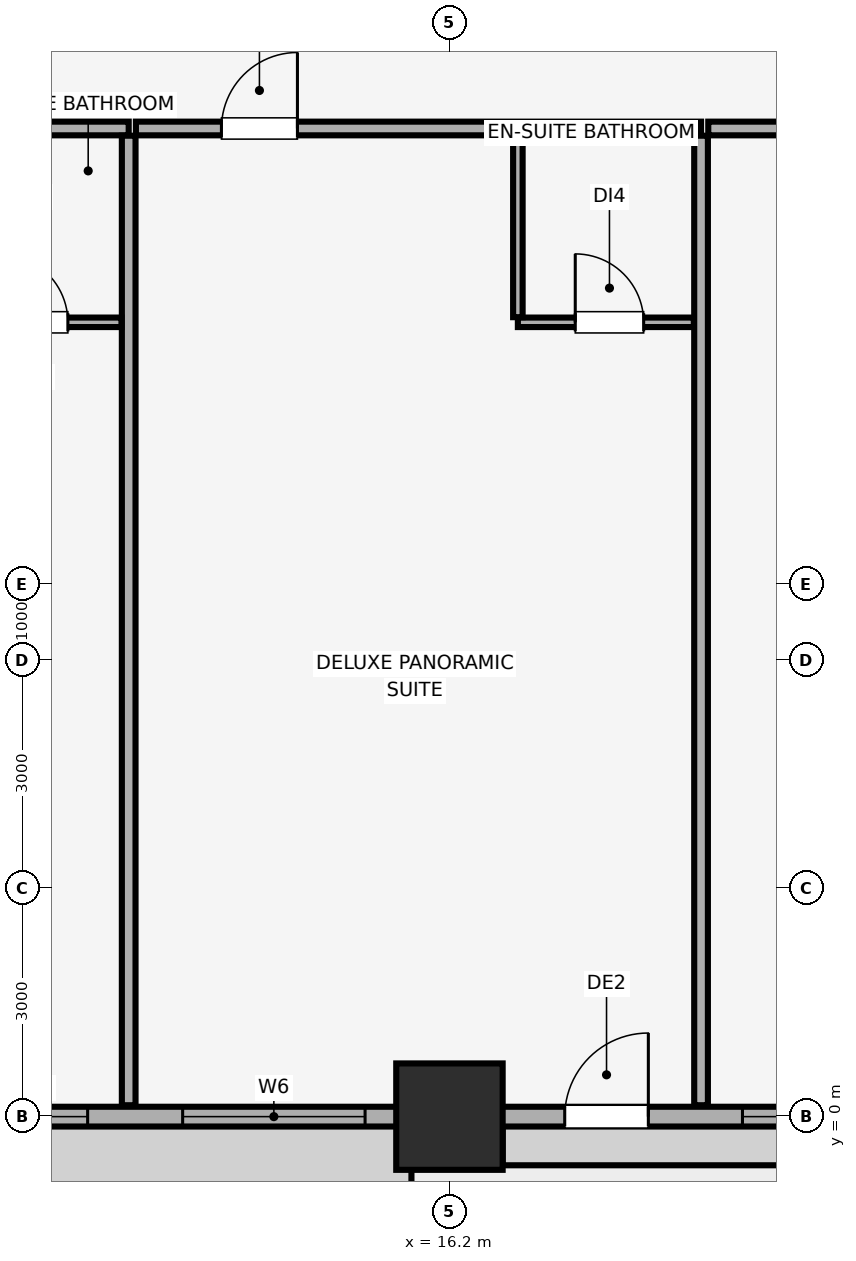
"""IFC4 building model, lengths in metres.
Left out: names, types, materials, properties, quantities, classifications, styles, units other than length and angle.
Written with IfcOpenShell. Run it as: python <this file> out.ifc"""

import sys

from ifc_helpers import new_model, si_unit, direction, frame, frame_2d, origin, origin_2d, place, context, subcontext, project, spatial, rectangle, extrude, element, fill, save


model = new_model("IFC4")
c1 = context("Model", 3, precision=1e-05, world=origin(), true_north=direction((0.0, 1.0)))
c2 = subcontext(c1, "Body", "Model", "MODEL_VIEW")
j1 = project(units=[si_unit("LENGTHUNIT", "METRE"), si_unit("PLANEANGLEUNIT", "RADIAN")], contexts=[c1])
p1 = place(None, origin())
s1 = spatial("IfcSite", under=j1, at=p1, CompositionType="ELEMENT")
p2 = place(p1, origin())
s2 = spatial("IfcBuilding", under=s1, at=p2, CompositionType="ELEMENT")
p3 = place(p2, frame((0.0, 0.0, 68.9)))
s3 = spatial("IfcBuildingStorey", under=s2, at=p3, CompositionType="ELEMENT", Elevation=68.9)
p4 = place(p3, frame((16.2, 0.0, 0.0), z_axis=(0.0, 0.0, 1.0), x_axis=(1.0, 0.0, 0.0)))
e1 = element("IfcColumn", 1, at=p4, inside=s3, PredefinedType="COLUMN", context=c2, shape_type="SweptSolid", body=[
    extrude(rectangle(XDim=1.4, YDim=1.4, at=origin_2d()), origin(), (0.0, 0.0, 1.0), 3.51),
])
p5 = place(p3, frame((4.2, 0.0, 0.0), z_axis=(0.0, 0.0, 1.0), x_axis=(1.0, 0.0, 0.0)))
e2 = element("IfcWall", 2, at=p5, inside=s3, PredefinedType="SOLIDWALL", context=c2, shape_type="SweptSolid", body=[
    extrude(rectangle(XDim=75.6, YDim=0.26, at=frame_2d((37.8, 0.0))), origin(), (0.0, 0.0, 1.0), 2.56),
])
p6 = place(p5, frame((13.517, 0.0, 0.0)))
e3 = element("IfcOpeningElement", 3, at=p6, cuts=e2, PredefinedType="OPENING", context=c2, shape_type="SweptSolid", body=[
    extrude(rectangle(XDim=1.1, YDim=2.15, at=frame_2d((0.55, 1.075))), frame((0.0, 0.14, 0.0), z_axis=(0.0, -1.0, 0.0), x_axis=(1.0, 0.0, 0.0)), (0.0, 0.0, 1.0), 0.28),
])
p7 = place(p5, frame((28.183, 0.0, 0.0)))
e4 = element("IfcOpeningElement", 4, at=p7, cuts=e2, PredefinedType="OPENING", context=c2, shape_type="SweptSolid", body=[
    extrude(rectangle(XDim=1.1, YDim=2.15, at=frame_2d((0.55, 1.075))), frame((0.0, 0.14, 0.0), z_axis=(0.0, -1.0, 0.0), x_axis=(1.0, 0.0, 0.0)), (0.0, 0.0, 1.0), 0.28),
])
p8 = place(p5, frame((58.094, 0.0, 0.0)))
e5 = element("IfcOpeningElement", 5, at=p8, cuts=e2, PredefinedType="OPENING", context=c2, shape_type="SweptSolid", body=[
    extrude(rectangle(XDim=1.1, YDim=2.15, at=frame_2d((0.55, 1.075))), frame((0.0, 0.14, 0.0), z_axis=(0.0, -1.0, 0.0), x_axis=(1.0, 0.0, 0.0)), (0.0, 0.0, 1.0), 0.28),
])
p9 = place(p5, frame((1.035, 0.0, 0.85)))
e6 = element("IfcOpeningElement", 6, at=p9, cuts=e2, PredefinedType="OPENING", context=c2, shape_type="SweptSolid", body=[
    extrude(rectangle(XDim=2.4, YDim=1.5, at=frame_2d((1.2, 0.75))), frame((0.0, 0.14, 0.0), z_axis=(0.0, -1.0, 0.0), x_axis=(1.0, 0.0, 0.0)), (0.0, 0.0, 1.0), 0.28),
])
p10 = place(p5, frame((5.74, 0.0, 0.85)))
e7 = element("IfcOpeningElement", 7, at=p10, cuts=e2, PredefinedType="OPENING", context=c2, shape_type="SweptSolid", body=[
    extrude(rectangle(XDim=1.5, YDim=1.4, at=frame_2d((0.75, 0.7))), frame((0.0, 0.14, 0.0), z_axis=(0.0, -1.0, 0.0), x_axis=(1.0, 0.0, 0.0)), (0.0, 0.0, 1.0), 0.28),
])
p11 = place(p5, frame((8.49, 0.0, 0.85)))
e8 = element("IfcOpeningElement", 8, at=p11, cuts=e2, PredefinedType="OPENING", context=c2, shape_type="SweptSolid", body=[
    extrude(rectangle(XDim=2.4, YDim=1.5, at=frame_2d((1.2, 0.75))), frame((0.0, 0.14, 0.0), z_axis=(0.0, -1.0, 0.0), x_axis=(1.0, 0.0, 0.0)), (0.0, 0.0, 1.0), 0.28),
])
p12 = place(p5, frame((15.855, 0.0, 0.85)))
e9 = element("IfcOpeningElement", 9, at=p12, cuts=e2, PredefinedType="OPENING", context=c2, shape_type="SweptSolid", body=[
    extrude(rectangle(XDim=2.4, YDim=1.5, at=frame_2d((1.2, 0.75))), frame((0.0, 0.14, 0.0), z_axis=(0.0, -1.0, 0.0), x_axis=(1.0, 0.0, 0.0)), (0.0, 0.0, 1.0), 0.28),
])
p13 = place(p5, frame((20.02, 0.0, 0.85)))
e10 = element("IfcOpeningElement", 10, at=p13, cuts=e2, PredefinedType="OPENING", context=c2, shape_type="SweptSolid", body=[
    extrude(rectangle(XDim=2.4, YDim=1.5, at=frame_2d((1.2, 0.75))), frame((0.0, 0.14, 0.0), z_axis=(0.0, -1.0, 0.0), x_axis=(1.0, 0.0, 0.0)), (0.0, 0.0, 1.0), 0.28),
])
p14 = place(p5, frame((23.67, 0.0, 0.85)))
e11 = element("IfcOpeningElement", 11, at=p14, cuts=e2, PredefinedType="OPENING", context=c2, shape_type="SweptSolid", body=[
    extrude(rectangle(XDim=1.5, YDim=1.4, at=frame_2d((0.75, 0.7))), frame((0.0, 0.14, 0.0), z_axis=(0.0, -1.0, 0.0), x_axis=(1.0, 0.0, 0.0)), (0.0, 0.0, 1.0), 0.28),
])
p15 = place(p5, frame((31.035, 0.0, 0.85)))
e12 = element("IfcOpeningElement", 12, at=p15, cuts=e2, PredefinedType="OPENING", context=c2, shape_type="SweptSolid", body=[
    extrude(rectangle(XDim=1.5, YDim=1.4, at=frame_2d((0.75, 0.7))), frame((0.0, 0.14, 0.0), z_axis=(0.0, -1.0, 0.0), x_axis=(1.0, 0.0, 0.0)), (0.0, 0.0, 1.0), 0.28),
])
p16 = place(p5, frame((34.75, 0.0, 0.85)))
e13 = element("IfcOpeningElement", 13, at=p16, cuts=e2, PredefinedType="OPENING", context=c2, shape_type="SweptSolid", body=[
    extrude(rectangle(XDim=2.4, YDim=1.5, at=frame_2d((1.2, 0.75))), frame((0.0, 0.14, 0.0), z_axis=(0.0, -1.0, 0.0), x_axis=(1.0, 0.0, 0.0)), (0.0, 0.0, 1.0), 0.28),
])
p17 = place(p5, frame((38.55, 0.0, 0.85)))
e14 = element("IfcOpeningElement", 14, at=p17, cuts=e2, PredefinedType="OPENING", context=c2, shape_type="SweptSolid", body=[
    extrude(rectangle(XDim=2.4, YDim=1.5, at=frame_2d((1.2, 0.75))), frame((0.0, 0.14, 0.0), z_axis=(0.0, -1.0, 0.0), x_axis=(1.0, 0.0, 0.0)), (0.0, 0.0, 1.0), 0.28),
])
p18 = place(p5, frame((43.165, 0.0, 0.85)))
e15 = element("IfcOpeningElement", 15, at=p18, cuts=e2, PredefinedType="OPENING", context=c2, shape_type="SweptSolid", body=[
    extrude(rectangle(XDim=1.5, YDim=1.4, at=frame_2d((0.75, 0.7))), frame((0.0, 0.14, 0.0), z_axis=(0.0, -1.0, 0.0), x_axis=(1.0, 0.0, 0.0)), (0.0, 0.0, 1.0), 0.28),
])
p19 = place(p5, frame((45.915, 0.0, 0.85)))
e16 = element("IfcOpeningElement", 16, at=p19, cuts=e2, PredefinedType="OPENING", context=c2, shape_type="SweptSolid", body=[
    extrude(rectangle(XDim=2.4, YDim=1.5, at=frame_2d((1.2, 0.75))), frame((0.0, 0.14, 0.0), z_axis=(0.0, -1.0, 0.0), x_axis=(1.0, 0.0, 0.0)), (0.0, 0.0, 1.0), 0.28),
])
p20 = place(p5, frame((50.081, 0.0, 0.85)))
e17 = element("IfcOpeningElement", 17, at=p20, cuts=e2, PredefinedType="OPENING", context=c2, shape_type="SweptSolid", body=[
    extrude(rectangle(XDim=2.4, YDim=1.5, at=frame_2d((1.2, 0.75))), frame((0.0, 0.14, 0.0), z_axis=(0.0, -1.0, 0.0), x_axis=(1.0, 0.0, 0.0)), (0.0, 0.0, 1.0), 0.28),
])
p21 = place(p5, frame((53.73, 0.0, 0.85)))
e18 = element("IfcOpeningElement", 18, at=p21, cuts=e2, PredefinedType="OPENING", context=c2, shape_type="SweptSolid", body=[
    extrude(rectangle(XDim=1.5, YDim=1.4, at=frame_2d((0.75, 0.7))), frame((0.0, 0.14, 0.0), z_axis=(0.0, -1.0, 0.0), x_axis=(1.0, 0.0, 0.0)), (0.0, 0.0, 1.0), 0.28),
])
p22 = place(p5, frame((61.095, 0.0, 0.85)))
e19 = element("IfcOpeningElement", 19, at=p22, cuts=e2, PredefinedType="OPENING", context=c2, shape_type="SweptSolid", body=[
    extrude(rectangle(XDim=1.5, YDim=1.4, at=frame_2d((0.75, 0.7))), frame((0.0, 0.14, 0.0), z_axis=(0.0, -1.0, 0.0), x_axis=(1.0, 0.0, 0.0)), (0.0, 0.0, 1.0), 0.28),
])
p23 = place(p5, frame((64.76, 0.0, 0.85)))
e20 = element("IfcOpeningElement", 20, at=p23, cuts=e2, PredefinedType="OPENING", context=c2, shape_type="SweptSolid", body=[
    extrude(rectangle(XDim=2.4, YDim=1.5, at=frame_2d((1.2, 0.75))), frame((0.0, 0.14, 0.0), z_axis=(0.0, -1.0, 0.0), x_axis=(1.0, 0.0, 0.0)), (0.0, 0.0, 1.0), 0.28),
])
p24 = place(p5, frame((68.41, 0.0, 0.85)))
e21 = element("IfcOpeningElement", 21, at=p24, cuts=e2, PredefinedType="OPENING", context=c2, shape_type="SweptSolid", body=[
    extrude(rectangle(XDim=1.5, YDim=1.4, at=frame_2d((0.75, 0.7))), frame((0.0, 0.14, 0.0), z_axis=(0.0, -1.0, 0.0), x_axis=(1.0, 0.0, 0.0)), (0.0, 0.0, 1.0), 0.28),
])
p25 = place(p5, frame((72.165, 0.0, 0.85)))
e22 = element("IfcOpeningElement", 22, at=p25, cuts=e2, PredefinedType="OPENING", context=c2, shape_type="SweptSolid", body=[
    extrude(rectangle(XDim=2.4, YDim=1.5, at=frame_2d((1.2, 0.75))), frame((0.0, 0.14, 0.0), z_axis=(0.0, -1.0, 0.0), x_axis=(1.0, 0.0, 0.0)), (0.0, 0.0, 1.0), 0.28),
])
p26 = place(p3, frame((0.15, 13.0, 0.0), z_axis=(0.0, 0.0, 1.0), x_axis=(1.0, 0.0, 0.0)))
e23 = element("IfcWall", 23, at=p26, inside=s3, PredefinedType="PARTITIONING", context=c2, shape_type="SweptSolid", body=[
    extrude(rectangle(XDim=11.83, YDim=0.18, at=frame_2d((5.915, 0.0))), origin(), (0.0, 0.0, 1.0), 3.51),
])
p27 = place(p26, frame((5.685, 0.0, 0.0)))
e24 = element("IfcOpeningElement", 24, at=p27, cuts=e23, PredefinedType="OPENING", context=c2, shape_type="SweptSolid", body=[
    extrude(rectangle(XDim=1.0, YDim=2.15, at=frame_2d((0.5, 1.075))), frame((0.0, 0.1, 0.0), z_axis=(0.0, -1.0, 0.0), x_axis=(1.0, 0.0, 0.0)), (0.0, 0.0, 1.0), 0.2),
])
p28 = place(p3, frame((11.98, 0.15, 0.0), z_axis=(0.0, 0.0, 1.0), x_axis=(0.0, 1.0, 0.0)))
e25 = element("IfcWall", 25, at=p28, inside=s3, PredefinedType="PARTITIONING", context=c2, shape_type="SweptSolid", body=[
    extrude(rectangle(XDim=12.755, YDim=0.18, at=frame_2d((6.377, 0.0))), origin(), (0.0, 0.0, 1.0), 3.51),
])
p29 = place(p3, frame((9.48, 10.45, 0.0), z_axis=(0.0, 0.0, 1.0), x_axis=(1.0, 0.0, 0.0)))
e26 = element("IfcWall", 26, at=p29, inside=s3, PredefinedType="PARTITIONING", context=c2, shape_type="SweptSolid", body=[
    extrude(rectangle(XDim=2.405, YDim=0.125, at=frame_2d((1.203, 0.0))), origin(), (0.0, 0.0, 1.0), 3.51),
])
p30 = place(p29, frame((0.8, 0.0, 0.0)))
e27 = element("IfcOpeningElement", 27, at=p30, cuts=e26, PredefinedType="OPENING", context=c2, shape_type="SweptSolid", body=[
    extrude(rectangle(XDim=0.9, YDim=2.1, at=frame_2d((0.45, 1.05))), frame((0.0, 0.073, 0.0), z_axis=(0.0, -1.0, 0.0), x_axis=(1.0, 0.0, 0.0)), (0.0, 0.0, 1.0), 0.145),
])
p31 = place(p3, frame((12.075, 13.0, 0.0), z_axis=(0.0, 0.0, 1.0), x_axis=(1.0, 0.0, 0.0)))
e28 = element("IfcWall", 28, at=p31, inside=s3, PredefinedType="PARTITIONING", context=c2, shape_type="SweptSolid", body=[
    extrude(rectangle(XDim=7.435, YDim=0.18, at=frame_2d((3.718, 0.0))), origin(), (0.0, 0.0, 1.0), 3.51),
])
p32 = place(p31, frame((1.125, 0.0, 0.0)))
e29 = element("IfcOpeningElement", 29, at=p32, cuts=e28, PredefinedType="OPENING", context=c2, shape_type="SweptSolid", body=[
    extrude(rectangle(XDim=1.0, YDim=2.15, at=frame_2d((0.5, 1.075))), frame((0.0, 0.1, 0.0), z_axis=(0.0, -1.0, 0.0), x_axis=(1.0, 0.0, 0.0)), (0.0, 0.0, 1.0), 0.2),
])
p33 = place(p3, frame((19.51, 0.15, 0.0), z_axis=(0.0, 0.0, 1.0), x_axis=(0.0, 1.0, 0.0)))
e30 = element("IfcWall", 30, at=p33, inside=s3, PredefinedType="PARTITIONING", context=c2, shape_type="SweptSolid", body=[
    extrude(rectangle(XDim=12.755, YDim=0.18, at=frame_2d((6.377, 0.0))), origin(), (0.0, 0.0, 1.0), 3.51),
])
p34 = place(p3, frame((17.1, 10.45, 0.0), z_axis=(0.0, 0.0, 1.0), x_axis=(1.0, 0.0, 0.0)))
e31 = element("IfcWall", 31, at=p34, inside=s3, PredefinedType="PARTITIONING", context=c2, shape_type="SweptSolid", body=[
    extrude(rectangle(XDim=2.315, YDim=0.125, at=frame_2d((1.158, 0.0))), origin(), (0.0, 0.0, 1.0), 3.51),
])
p35 = place(p34, frame((0.755, 0.0, 0.0)))
e32 = element("IfcOpeningElement", 32, at=p35, cuts=e31, PredefinedType="OPENING", context=c2, shape_type="SweptSolid", body=[
    extrude(rectangle(XDim=0.9, YDim=2.1, at=frame_2d((0.45, 1.05))), frame((0.0, 0.073, 0.0), z_axis=(0.0, -1.0, 0.0), x_axis=(1.0, 0.0, 0.0)), (0.0, 0.0, 1.0), 0.145),
])
p36 = place(p3, frame((17.1, 10.518, 0.0), z_axis=(0.0, 0.0, 1.0), x_axis=(0.0, 1.0, 0.0)))
e33 = element("IfcWall", 33, at=p36, inside=s3, PredefinedType="PARTITIONING", context=c2, shape_type="SweptSolid", body=[
    extrude(rectangle(XDim=2.387, YDim=0.125, at=frame_2d((1.194, 0.0))), origin(), (0.0, 0.0, 1.0), 3.51),
])
p37 = place(p3, frame((19.605, 13.0, 0.0), z_axis=(0.0, 0.0, 1.0), x_axis=(1.0, 0.0, 0.0)))
e34 = element("IfcWall", 34, at=p37, inside=s3, PredefinedType="PARTITIONING", context=c2, shape_type="SweptSolid", body=[
    extrude(rectangle(XDim=7.435, YDim=0.18, at=frame_2d((3.718, 0.0))), origin(), (0.0, 0.0, 1.0), 3.51),
])
p38 = place(p37, frame((0.96, 0.0, 0.0)))
e35 = element("IfcOpeningElement", 35, at=p38, cuts=e34, PredefinedType="OPENING", context=c2, shape_type="SweptSolid", body=[
    extrude(rectangle(XDim=1.0, YDim=2.15, at=frame_2d((0.5, 1.075))), frame((0.0, 0.1, 0.0), z_axis=(0.0, -1.0, 0.0), x_axis=(1.0, 0.0, 0.0)), (0.0, 0.0, 1.0), 0.2),
])
p39 = place(p6, origin())
e36 = element("IfcDoor", 36, at=p39, inside=s3, OperationType="SINGLE_SWING_RIGHT", PredefinedType="DOOR", context=c2, shape_type="SweptSolid", body=[
    extrude(rectangle(XDim=1.1, YDim=2.15, at=frame_2d((0.55, 1.075))), frame((0.0, 0.025, 0.0), z_axis=(0.0, -1.0, 0.0), x_axis=(1.0, 0.0, 0.0)), (0.0, 0.0, 1.0), 0.05),
])
fill(e3, e36)
p40 = place(p10, origin())
e37 = element("IfcWindow", 37, at=p40, inside=s3, PartitioningType="SINGLE_PANEL", PredefinedType="WINDOW", context=c2, shape_type="SweptSolid", body=[
    extrude(rectangle(XDim=1.5, YDim=1.4, at=frame_2d((0.75, 0.7))), frame((0.0, 0.03, 0.0), z_axis=(0.0, -1.0, 0.0), x_axis=(1.0, 0.0, 0.0)), (0.0, 0.0, 1.0), 0.06),
])
fill(e7, e37)
p41 = place(p11, origin())
e38 = element("IfcWindow", 38, at=p41, inside=s3, PartitioningType="SINGLE_PANEL", PredefinedType="WINDOW", context=c2, shape_type="SweptSolid", body=[
    extrude(rectangle(XDim=2.4, YDim=1.5, at=frame_2d((1.2, 0.75))), frame((0.0, 0.03, 0.0), z_axis=(0.0, -1.0, 0.0), x_axis=(1.0, 0.0, 0.0)), (0.0, 0.0, 1.0), 0.06),
])
fill(e8, e38)
p42 = place(p12, origin())
e39 = element("IfcWindow", 39, at=p42, inside=s3, PartitioningType="SINGLE_PANEL", PredefinedType="WINDOW", context=c2, shape_type="SweptSolid", body=[
    extrude(rectangle(XDim=2.4, YDim=1.5, at=frame_2d((1.2, 0.75))), frame((0.0, 0.03, 0.0), z_axis=(0.0, -1.0, 0.0), x_axis=(1.0, 0.0, 0.0)), (0.0, 0.0, 1.0), 0.06),
])
fill(e9, e39)
p43 = place(p30, origin())
e40 = element("IfcDoor", 40, at=p43, inside=s3, OperationType="SINGLE_SWING_LEFT", PredefinedType="DOOR", context=c2, shape_type="SweptSolid", body=[
    extrude(rectangle(XDim=0.9, YDim=2.1, at=frame_2d((0.45, 1.05))), frame((0.0, 0.025, 0.0), z_axis=(0.0, -1.0, 0.0), x_axis=(1.0, 0.0, 0.0)), (0.0, 0.0, 1.0), 0.05),
])
fill(e27, e40)
p44 = place(p32, origin())
e41 = element("IfcDoor", 41, at=p44, inside=s3, OperationType="SINGLE_SWING_RIGHT", PredefinedType="DOOR", context=c2, shape_type="SweptSolid", body=[
    extrude(rectangle(XDim=1.0, YDim=2.15, at=frame_2d((0.5, 1.075))), frame((0.0, 0.025, 0.0), z_axis=(0.0, -1.0, 0.0), x_axis=(1.0, 0.0, 0.0)), (0.0, 0.0, 1.0), 0.05),
])
fill(e29, e41)
p45 = place(p35, origin())
e42 = element("IfcDoor", 42, at=p45, inside=s3, OperationType="SINGLE_SWING_LEFT", PredefinedType="DOOR", context=c2, shape_type="SweptSolid", body=[
    extrude(rectangle(XDim=0.9, YDim=2.1, at=frame_2d((0.45, 1.05))), frame((0.0, 0.025, 0.0), z_axis=(0.0, -1.0, 0.0), x_axis=(1.0, 0.0, 0.0)), (0.0, 0.0, 1.0), 0.05),
])
fill(e32, e42)
save(model, sys.argv[1])
